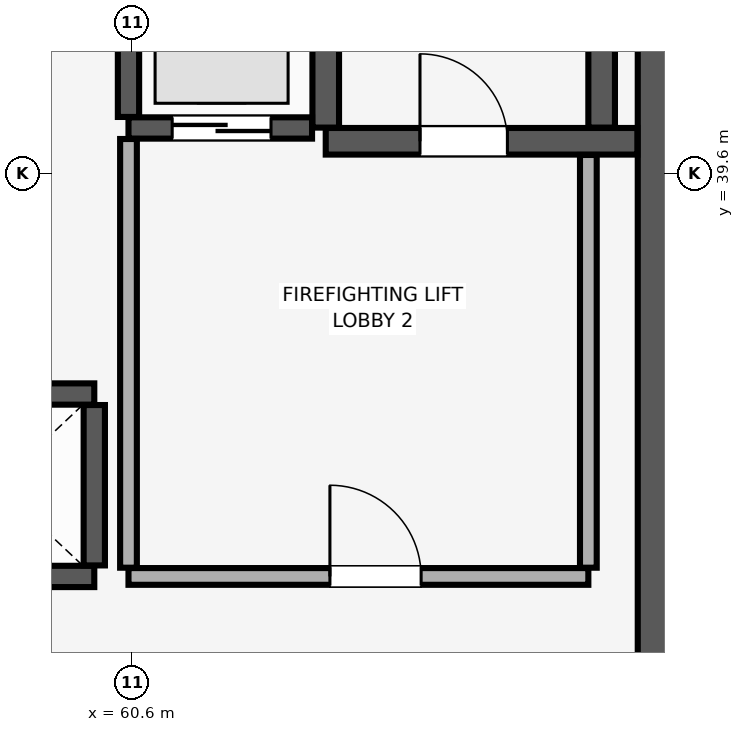
"""IFC4 building model, lengths in metres.
Left out: names, types, materials, properties, quantities, classifications, styles, units other than length and angle.
Written with IfcOpenShell. Run it as: python <this file> out.ifc"""

import sys

from ifc_helpers import new_model, si_unit, direction, frame, frame_2d, origin, place, context, subcontext, project, spatial, rectangle, extrude, element, fill, save


model = new_model("IFC4")
c1 = context("Model", 3, precision=1e-05, world=origin(), true_north=direction((0.0, 1.0)))
c2 = subcontext(c1, "Body", "Model", "MODEL_VIEW")
j1 = project(units=[si_unit("LENGTHUNIT", "METRE"), si_unit("PLANEANGLEUNIT", "RADIAN")], contexts=[c1])
p1 = place(None, origin())
s1 = spatial("IfcSite", under=j1, at=p1, CompositionType="ELEMENT")
p2 = place(p1, origin())
s2 = spatial("IfcBuilding", under=s1, at=p2, CompositionType="ELEMENT")
p3 = place(p2, frame((0.0, 0.0, 72.65)))
s3 = spatial("IfcBuildingStorey", under=s2, at=p3, CompositionType="ELEMENT", Elevation=72.65)
p4 = place(p3, frame((67.8, 29.4, 0.0), z_axis=(0.0, 0.0, 1.0), x_axis=(0.0, 1.0, 0.0)))
e1 = element("IfcWall", 1, at=p4, inside=s3, PredefinedType="SHEAR", context=c2, shape_type="SweptSolid", body=[
    extrude(rectangle(XDim=19.2, YDim=1.1, at=frame_2d((9.6, 0.0))), origin(), (0.0, 0.0, 1.0), 3.51),
])
p5 = place(p3, frame((63.145, 40.025, 0.0), z_axis=(0.0, 0.0, 1.0), x_axis=(1.0, 0.0, 0.0)))
e2 = element("IfcWall", 2, at=p5, inside=s3, PredefinedType="SHEAR", context=c2, shape_type="SweptSolid", body=[
    extrude(rectangle(XDim=4.1, YDim=0.35, at=frame_2d((2.05, 0.0))), origin(), (0.0, 0.0, 1.0), 3.51),
])
p6 = place(p5, frame((1.24, 0.0, 0.0)))
e3 = element("IfcOpeningElement", 3, at=p6, cuts=e2, PredefinedType="OPENING", context=c2, shape_type="SweptSolid", body=[
    extrude(rectangle(XDim=1.15, YDim=2.15, at=frame_2d((0.575, 1.075))), frame((0.0, 0.185, 0.0), z_axis=(0.0, -1.0, 0.0), x_axis=(1.0, 0.0, 0.0)), (0.0, 0.0, 1.0), 0.37),
])
for number, where, z_axis, x_axis in (
    (4, (63.145, 40.205, 0.0), (0.0, 0.0, 1.0), (0.0, 1.0, 0.0)),
    (5, (66.775, 40.205, 0.0), (0.0, 0.0, 1.0), (0.0, 1.0, 0.0)),
):
    element("IfcWall", number, at=place(p3, frame(where, z_axis=z_axis, x_axis=x_axis)), inside=s3, PredefinedType="SHEAR", context=c2, shape_type="SweptSolid", body=[
        extrude(rectangle(XDim=8.09, YDim=0.35, at=frame_2d((4.045, 0.0))), origin(), (0.0, 0.0, 1.0), 3.51),
    ])
for number, where, z_axis, x_axis in (
    (6, (57.55, 34.3, 0.0), (0.0, 0.0, 1.0), (1.0, 0.0, 0.0)),
    (7, (57.55, 36.7, 0.0), (0.0, 0.0, 1.0), (1.0, 0.0, 0.0)),
):
    element("IfcWall", number, at=place(p3, frame(where, z_axis=z_axis, x_axis=x_axis)), inside=s3, PredefinedType="SHEAR", context=c2, shape_type="SweptSolid", body=[
        extrude(rectangle(XDim=2.55, YDim=0.28, at=frame_2d((1.275, 0.0))), origin(), (0.0, 0.0, 1.0), 3.51),
    ])
p7 = place(p3, frame((60.1, 34.445, 0.0), z_axis=(0.0, 0.0, 1.0), x_axis=(0.0, 1.0, 0.0)))
e8 = element("IfcWall", 8, at=p7, inside=s3, PredefinedType="SHEAR", context=c2, shape_type="SweptSolid", body=[
    extrude(rectangle(XDim=2.11, YDim=0.28, at=frame_2d((1.055, 0.0))), origin(), (0.0, 0.0, 1.0), 3.51),
])
p8 = place(p3, frame((60.55, 40.2, 0.0), z_axis=(0.0, 0.0, 1.0), x_axis=(1.0, 0.0, 0.0)))
e9 = element("IfcWall", 9, at=p8, inside=s3, PredefinedType="SHEAR", context=c2, shape_type="SweptSolid", body=[
    extrude(rectangle(XDim=2.415, YDim=0.28, at=frame_2d((1.208, 0.0))), origin(), (0.0, 0.0, 1.0), 3.51),
])
p9 = place(p8, frame((0.575, 0.0, 0.0)))
e10 = element("IfcOpeningElement", 10, at=p9, cuts=e9, PredefinedType="OPENING", context=c2, shape_type="SweptSolid", body=[
    extrude(rectangle(XDim=1.3, YDim=2.3, at=frame_2d((0.65, 1.15))), frame((0.0, 0.15, 0.0), z_axis=(0.0, -1.0, 0.0), x_axis=(1.0, 0.0, 0.0)), (0.0, 0.0, 1.0), 0.3),
])
p10 = place(p3, frame((60.55, 40.345, 0.0), z_axis=(0.0, 0.0, 1.0), x_axis=(0.0, 1.0, 0.0)))
e11 = element("IfcWall", 11, at=p10, inside=s3, PredefinedType="SHEAR", context=c2, shape_type="SweptSolid", body=[
    extrude(rectangle(XDim=2.81, YDim=0.28, at=frame_2d((1.405, 0.0))), origin(), (0.0, 0.0, 1.0), 3.51),
])
p11 = place(p3, frame((60.55, 34.3, 0.0), z_axis=(0.0, 0.0, 1.0), x_axis=(1.0, 0.0, 0.0)))
e12 = element("IfcWall", 12, at=p11, inside=s3, PredefinedType="PARTITIONING", context=c2, shape_type="SweptSolid", body=[
    extrude(rectangle(XDim=6.05, YDim=0.22, at=frame_2d((3.025, 0.0))), origin(), (0.0, 0.0, 1.0), 3.51),
])
p12 = place(p11, frame((2.65, 0.0, 0.0)))
e13 = element("IfcOpeningElement", 13, at=p12, cuts=e12, PredefinedType="OPENING", context=c2, shape_type="SweptSolid", body=[
    extrude(rectangle(XDim=1.2, YDim=2.15, at=frame_2d((0.6, 1.075))), frame((0.0, 0.12, 0.0), z_axis=(0.0, -1.0, 0.0), x_axis=(1.0, 0.0, 0.0)), (0.0, 0.0, 1.0), 0.24),
])
p13 = place(p3, frame((60.55, 34.415, 0.0), z_axis=(0.0, 0.0, 1.0), x_axis=(0.0, 1.0, 0.0)))
e14 = element("IfcWall", 14, at=p13, inside=s3, PredefinedType="PARTITIONING", context=c2, shape_type="SweptSolid", body=[
    extrude(rectangle(XDim=5.64, YDim=0.22, at=frame_2d((2.82, 0.0))), origin(), (0.0, 0.0, 1.0), 3.51),
])
p14 = place(p3, frame((66.6, 34.415, 0.0), z_axis=(0.0, 0.0, 1.0), x_axis=(0.0, 1.0, 0.0)))
e15 = element("IfcWall", 15, at=p14, inside=s3, PredefinedType="PARTITIONING", context=c2, shape_type="SweptSolid", body=[
    extrude(rectangle(XDim=5.43, YDim=0.22, at=frame_2d((2.715, 0.0))), origin(), (0.0, 0.0, 1.0), 3.51),
])
p15 = place(p6, origin())
e16 = element("IfcDoor", 16, at=p15, inside=s3, OperationType="SINGLE_SWING_LEFT", PredefinedType="DOOR", context=c2, shape_type="SweptSolid", body=[
    extrude(rectangle(XDim=1.15, YDim=2.15, at=frame_2d((0.575, 1.075))), frame((0.0, 0.025, 0.0), z_axis=(0.0, -1.0, 0.0), x_axis=(1.0, 0.0, 0.0)), (0.0, 0.0, 1.0), 0.05),
])
fill(e3, e16)
p16 = place(p9, origin())
e17 = element("IfcDoor", 17, at=p16, inside=s3, OperationType="DOUBLE_DOOR_SLIDING", PredefinedType="DOOR", context=c2, shape_type="SweptSolid", body=[
    extrude(rectangle(XDim=1.3, YDim=2.3, at=frame_2d((0.65, 1.15))), frame((0.0, 0.025, 0.0), z_axis=(0.0, -1.0, 0.0), x_axis=(1.0, 0.0, 0.0)), (0.0, 0.0, 1.0), 0.05),
])
fill(e10, e17)
p17 = place(p12, origin())
e18 = element("IfcDoor", 18, at=p17, inside=s3, OperationType="SINGLE_SWING_LEFT", PredefinedType="DOOR", context=c2, shape_type="SweptSolid", body=[
    extrude(rectangle(XDim=1.2, YDim=2.15, at=frame_2d((0.6, 1.075))), frame((0.0, 0.025, 0.0), z_axis=(0.0, -1.0, 0.0), x_axis=(1.0, 0.0, 0.0)), (0.0, 0.0, 1.0), 0.05),
])
fill(e13, e18)
save(model, sys.argv[1])
